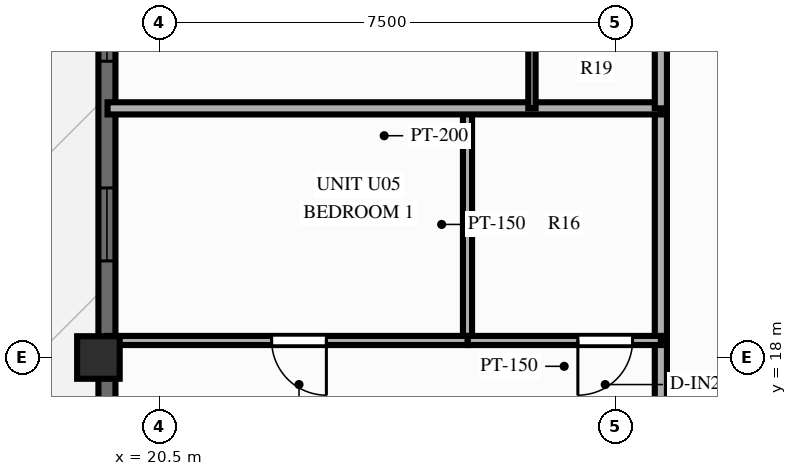
"""IFC4 building model, lengths in metres.
Left out: names, types, materials, properties, quantities, classifications, styles, units other than length and angle.
Written with IfcOpenShell. Run it as: python <this file> out.ifc"""

import sys

from ifc_helpers import new_model, si_unit, direction, frame, frame_2d, origin, origin_2d, place, context, subcontext, project, spatial, rectangle, extrude, source, transform, mapped, element, fill, save


model = new_model("IFC4")
c1 = context("Model", 3, precision=1e-05, world=origin(), true_north=direction((0.0, 1.0)))
c2 = subcontext(c1, "Body", "Model", "MODEL_VIEW")
j1 = project(units=[si_unit("LENGTHUNIT", "METRE"), si_unit("PLANEANGLEUNIT", "RADIAN")], contexts=[c1])
p1 = place(None, origin())
s1 = spatial("IfcSite", under=j1, at=p1, CompositionType="ELEMENT")
p2 = place(p1, origin())
s2 = spatial("IfcBuilding", under=s1, at=p2, CompositionType="ELEMENT")
p3 = place(p2, frame((0.0, 0.0, 216.3)))
s3 = spatial("IfcBuildingStorey", under=s2, at=p3, CompositionType="ELEMENT", Elevation=216.3)
m1 = source(origin(), c2, "Body", "SweptSolid", [
    extrude(rectangle(XDim=0.7, YDim=0.7, at=origin_2d()), origin(), (0.0, 0.0, 1.0), 3.9),
])
p4 = place(p3, frame((19.5, 18.0, 0.0), z_axis=(0.0, 0.0, 1.0), x_axis=(1.0, 0.0, 0.0)))
e1 = element("IfcColumn", 1, at=p4, inside=s3, PredefinedType="COLUMN", context=c2, shape_type="MappedRepresentation", body=[
    mapped(m1, transform((0.0, 0.0, 0.0), scale=1.0)),
])
p5 = place(p3, frame((19.64, 11.5, 0.0), z_axis=(0.0, 0.0, 1.0), x_axis=(0.0, 1.0, 0.0)))
e2 = element("IfcWall", 2, at=p5, inside=s3, PredefinedType="SOLIDWALL", context=c2, shape_type="SweptSolid", body=[
    extrude(rectangle(XDim=31.0, YDim=0.28, at=frame_2d((15.5, 0.0))), origin(), (0.0, 0.0, 1.0), 2.44),
])
p6 = place(p5, frame((0.96, 0.0, 0.25)))
e3 = element("IfcOpeningElement", 3, at=p6, cuts=e2, PredefinedType="OPENING", context=c2, shape_type="SweptSolid", body=[
    extrude(rectangle(XDim=1.2, YDim=1.5, at=frame_2d((0.6, 0.75))), frame((0.0, 0.152, 0.0), z_axis=(0.0, -1.0, 0.0), x_axis=(1.0, 0.0, 0.0)), (0.0, 0.0, 1.0), 0.304),
])
p7 = place(p5, frame((4.02, 0.0, 0.25)))
e4 = element("IfcOpeningElement", 4, at=p7, cuts=e2, PredefinedType="OPENING", context=c2, shape_type="SweptSolid", body=[
    extrude(rectangle(XDim=1.2, YDim=1.5, at=frame_2d((0.6, 0.75))), frame((0.0, 0.152, 0.0), z_axis=(0.0, -1.0, 0.0), x_axis=(1.0, 0.0, 0.0)), (0.0, 0.0, 1.0), 0.304),
])
p8 = place(p5, frame((8.089, 0.0, 0.25)))
e5 = element("IfcOpeningElement", 5, at=p8, cuts=e2, PredefinedType="OPENING", context=c2, shape_type="SweptSolid", body=[
    extrude(rectangle(XDim=1.2, YDim=1.5, at=frame_2d((0.6, 0.75))), frame((0.0, 0.152, 0.0), z_axis=(0.0, -1.0, 0.0), x_axis=(1.0, 0.0, 0.0)), (0.0, 0.0, 1.0), 0.304),
])
p9 = place(p5, frame((11.373, 0.0, 0.25)))
e6 = element("IfcOpeningElement", 6, at=p9, cuts=e2, PredefinedType="OPENING", context=c2, shape_type="SweptSolid", body=[
    extrude(rectangle(XDim=1.2, YDim=1.5, at=frame_2d((0.6, 0.75))), frame((0.0, 0.152, 0.0), z_axis=(0.0, -1.0, 0.0), x_axis=(1.0, 0.0, 0.0)), (0.0, 0.0, 1.0), 0.304),
])
p10 = place(p5, frame((14.307, 0.0, 0.0)))
e7 = element("IfcOpeningElement", 7, at=p10, cuts=e2, PredefinedType="OPENING", context=c2, shape_type="SweptSolid", body=[
    extrude(rectangle(XDim=1.6, YDim=2.15, at=frame_2d((0.8, 1.075))), frame((0.0, 0.152, 0.0), z_axis=(0.0, -1.0, 0.0), x_axis=(1.0, 0.0, 0.0)), (0.0, 0.0, 1.0), 0.304),
])
p11 = place(p5, frame((18.188, 0.0, 0.25)))
e8 = element("IfcOpeningElement", 8, at=p11, cuts=e2, PredefinedType="OPENING", context=c2, shape_type="SweptSolid", body=[
    extrude(rectangle(XDim=1.2, YDim=1.5, at=frame_2d((0.6, 0.75))), frame((0.0, 0.152, 0.0), z_axis=(0.0, -1.0, 0.0), x_axis=(1.0, 0.0, 0.0)), (0.0, 0.0, 1.0), 0.304),
])
p12 = place(p5, frame((21.484, 0.0, 0.25)))
e9 = element("IfcOpeningElement", 9, at=p12, cuts=e2, PredefinedType="OPENING", context=c2, shape_type="SweptSolid", body=[
    extrude(rectangle(XDim=1.2, YDim=1.5, at=frame_2d((0.6, 0.75))), frame((0.0, 0.152, 0.0), z_axis=(0.0, -1.0, 0.0), x_axis=(1.0, 0.0, 0.0)), (0.0, 0.0, 1.0), 0.304),
])
p13 = place(p5, frame((25.234, 0.0, 0.25)))
e10 = element("IfcOpeningElement", 10, at=p13, cuts=e2, PredefinedType="OPENING", context=c2, shape_type="SweptSolid", body=[
    extrude(rectangle(XDim=1.2, YDim=1.5, at=frame_2d((0.6, 0.75))), frame((0.0, 0.152, 0.0), z_axis=(0.0, -1.0, 0.0), x_axis=(1.0, 0.0, 0.0)), (0.0, 0.0, 1.0), 0.304),
])
p14 = place(p5, frame((28.294, 0.0, 0.25)))
e11 = element("IfcOpeningElement", 11, at=p14, cuts=e2, PredefinedType="OPENING", context=c2, shape_type="SweptSolid", body=[
    extrude(rectangle(XDim=1.2, YDim=1.5, at=frame_2d((0.6, 0.75))), frame((0.0, 0.152, 0.0), z_axis=(0.0, -1.0, 0.0), x_axis=(1.0, 0.0, 0.0)), (0.0, 0.0, 1.0), 0.304),
])
p15 = place(p3, frame((28.75, 14.43, 0.0), z_axis=(0.0, 0.0, 1.0), x_axis=(0.0, 1.0, 0.0)))
e12 = element("IfcWall", 12, at=p15, inside=s3, PredefinedType="PARTITIONING", context=c2, shape_type="SweptSolid", body=[
    extrude(rectangle(XDim=3.85, YDim=0.2, at=frame_2d((1.925, 0.0))), origin(), (0.0, 0.0, 1.0), 3.56),
])
p16 = place(p15, frame((1.425, 0.0, 0.0)))
e13 = element("IfcOpeningElement", 13, at=p16, cuts=e12, PredefinedType="OPENING", context=c2, shape_type="SweptSolid", body=[
    extrude(rectangle(XDim=1.0, YDim=2.15, at=frame_2d((0.5, 1.075))), frame((0.0, 0.112, 0.0), z_axis=(0.0, -1.0, 0.0), x_axis=(1.0, 0.0, 0.0)), (0.0, 0.0, 1.0), 0.224),
])
p17 = place(p3, frame((28.75, 18.28, 0.0), z_axis=(0.0, 0.0, 1.0), x_axis=(0.0, 1.0, 0.0)))
e14 = element("IfcWall", 14, at=p17, inside=s3, PredefinedType="PARTITIONING", context=c2, shape_type="SweptSolid", body=[
    extrude(rectangle(XDim=3.818, YDim=0.2, at=frame_2d((1.909, 0.0))), origin(), (0.0, 0.0, 1.0), 3.56),
])
p18 = place(p3, frame((25.57, 18.28, 0.0), z_axis=(0.0, 0.0, 1.0), x_axis=(0.0, 1.0, 0.0)))
e15 = element("IfcWall", 15, at=p18, inside=s3, PredefinedType="PARTITIONING", context=c2, shape_type="SweptSolid", body=[
    extrude(rectangle(XDim=3.818, YDim=0.15, at=frame_2d((1.909, 0.0))), origin(), (0.0, 0.0, 1.0), 3.39),
])
p19 = place(p3, frame((28.75, 18.28, 0.0), z_axis=(0.0, 0.0, 1.0), x_axis=(-1.0, 0.0, 0.0)))
e16 = element("IfcWall", 16, at=p19, inside=s3, PredefinedType="PARTITIONING", context=c2, shape_type="SweptSolid", body=[
    extrude(rectangle(XDim=3.18, YDim=0.15, at=frame_2d((1.59, 0.0))), origin(), (0.0, 0.0, 1.0), 3.56),
])
p20 = place(p19, frame((0.465, 0.0, 0.0)))
e17 = element("IfcOpeningElement", 17, at=p20, cuts=e16, PredefinedType="OPENING", context=c2, shape_type="SweptSolid", body=[
    extrude(rectangle(XDim=0.9, YDim=2.1, at=frame_2d((0.45, 1.05))), frame((0.0, 0.087, 0.0), z_axis=(0.0, -1.0, 0.0), x_axis=(1.0, 0.0, 0.0)), (0.0, 0.0, 1.0), 0.174),
])
p21 = place(p3, frame((25.57, 18.28, 0.0), z_axis=(0.0, 0.0, 1.0), x_axis=(-1.0, 0.0, 0.0)))
e18 = element("IfcWall", 18, at=p21, inside=s3, PredefinedType="PARTITIONING", context=c2, shape_type="SweptSolid", body=[
    extrude(rectangle(XDim=5.92, YDim=0.15, at=frame_2d((2.96, 0.0))), origin(), (0.0, 0.0, 1.0), 3.56),
])
p22 = place(p21, frame((2.321, 0.0, 0.0)))
e19 = element("IfcOpeningElement", 19, at=p22, cuts=e18, PredefinedType="OPENING", context=c2, shape_type="SweptSolid", body=[
    extrude(rectangle(XDim=0.9, YDim=2.1, at=frame_2d((0.45, 1.05))), frame((0.0, 0.087, 0.0), z_axis=(0.0, -1.0, 0.0), x_axis=(1.0, 0.0, 0.0)), (0.0, 0.0, 1.0), 0.174),
])
p23 = place(p3, frame((28.75, 22.098, 0.0), z_axis=(0.0, 0.0, 1.0), x_axis=(-1.0, 0.0, 0.0)))
e20 = element("IfcWall", 20, at=p23, inside=s3, PredefinedType="PARTITIONING", context=c2, shape_type="SweptSolid", body=[
    extrude(rectangle(XDim=9.1, YDim=0.2, at=frame_2d((4.55, 0.0))), origin(), (0.0, 0.0, 1.0), 3.29),
])
p24 = place(p3, frame((28.75, 22.098, 0.0), z_axis=(0.0, 0.0, 1.0), x_axis=(0.0, 1.0, 0.0)))
e21 = element("IfcWall", 21, at=p24, inside=s3, PredefinedType="PARTITIONING", context=c2, shape_type="SweptSolid", body=[
    extrude(rectangle(XDim=2.75, YDim=0.2, at=frame_2d((1.375, 0.0))), origin(), (0.0, 0.0, 1.0), 3.56),
])
p25 = place(p3, frame((26.63, 22.098, 0.0), z_axis=(0.0, 0.0, 1.0), x_axis=(0.0, 1.0, 0.0)))
e22 = element("IfcWall", 22, at=p25, inside=s3, PredefinedType="PARTITIONING", context=c2, shape_type="SweptSolid", body=[
    extrude(rectangle(XDim=2.75, YDim=0.12, at=frame_2d((1.375, 0.0))), origin(), (0.0, 0.0, 1.0), 3.56),
])
m2 = source(origin(), c2, "Body", "SweptSolid", [
    extrude(rectangle(XDim=1.2, YDim=1.5, at=frame_2d((0.6, 0.75))), frame((0.0, 0.03, 0.0), z_axis=(0.0, -1.0, 0.0), x_axis=(1.0, 0.0, 0.0)), (0.0, 0.0, 1.0), 0.06),
])
p26 = place(p8, origin())
e23 = element("IfcWindow", 23, at=p26, inside=s3, PartitioningType="SINGLE_PANEL", PredefinedType="WINDOW", context=c2, shape_type="MappedRepresentation", body=[
    mapped(m2, transform((0.0, 0.0, 0.0), scale=1.0)),
])
fill(e5, e23)
p27 = place(p9, origin())
e24 = element("IfcWindow", 24, at=p27, inside=s3, PartitioningType="SINGLE_PANEL", PredefinedType="WINDOW", context=c2, shape_type="MappedRepresentation", body=[
    mapped(m2, transform((0.0, 0.0, 0.0), scale=1.0)),
])
fill(e6, e24)
m3 = source(origin(), c2, "Body", "SweptSolid", [
    extrude(rectangle(XDim=0.9, YDim=2.1, at=frame_2d((0.45, 1.05))), frame((0.0, 0.025, 0.0), z_axis=(0.0, -1.0, 0.0), x_axis=(1.0, 0.0, 0.0)), (0.0, 0.0, 1.0), 0.05),
])
p28 = place(p20, origin())
e25 = element("IfcDoor", 25, at=p28, inside=s3, OperationType="SINGLE_SWING_RIGHT", PredefinedType="DOOR", context=c2, shape_type="MappedRepresentation", body=[
    mapped(m3, transform((0.0, 0.0, 0.0), scale=1.0)),
])
fill(e17, e25)
p29 = place(p22, origin())
e26 = element("IfcDoor", 26, at=p29, inside=s3, OperationType="SINGLE_SWING_LEFT", PredefinedType="DOOR", context=c2, shape_type="MappedRepresentation", body=[
    mapped(m3, transform((0.0, 0.0, 0.0), scale=1.0)),
])
fill(e19, e26)
save(model, sys.argv[1])
